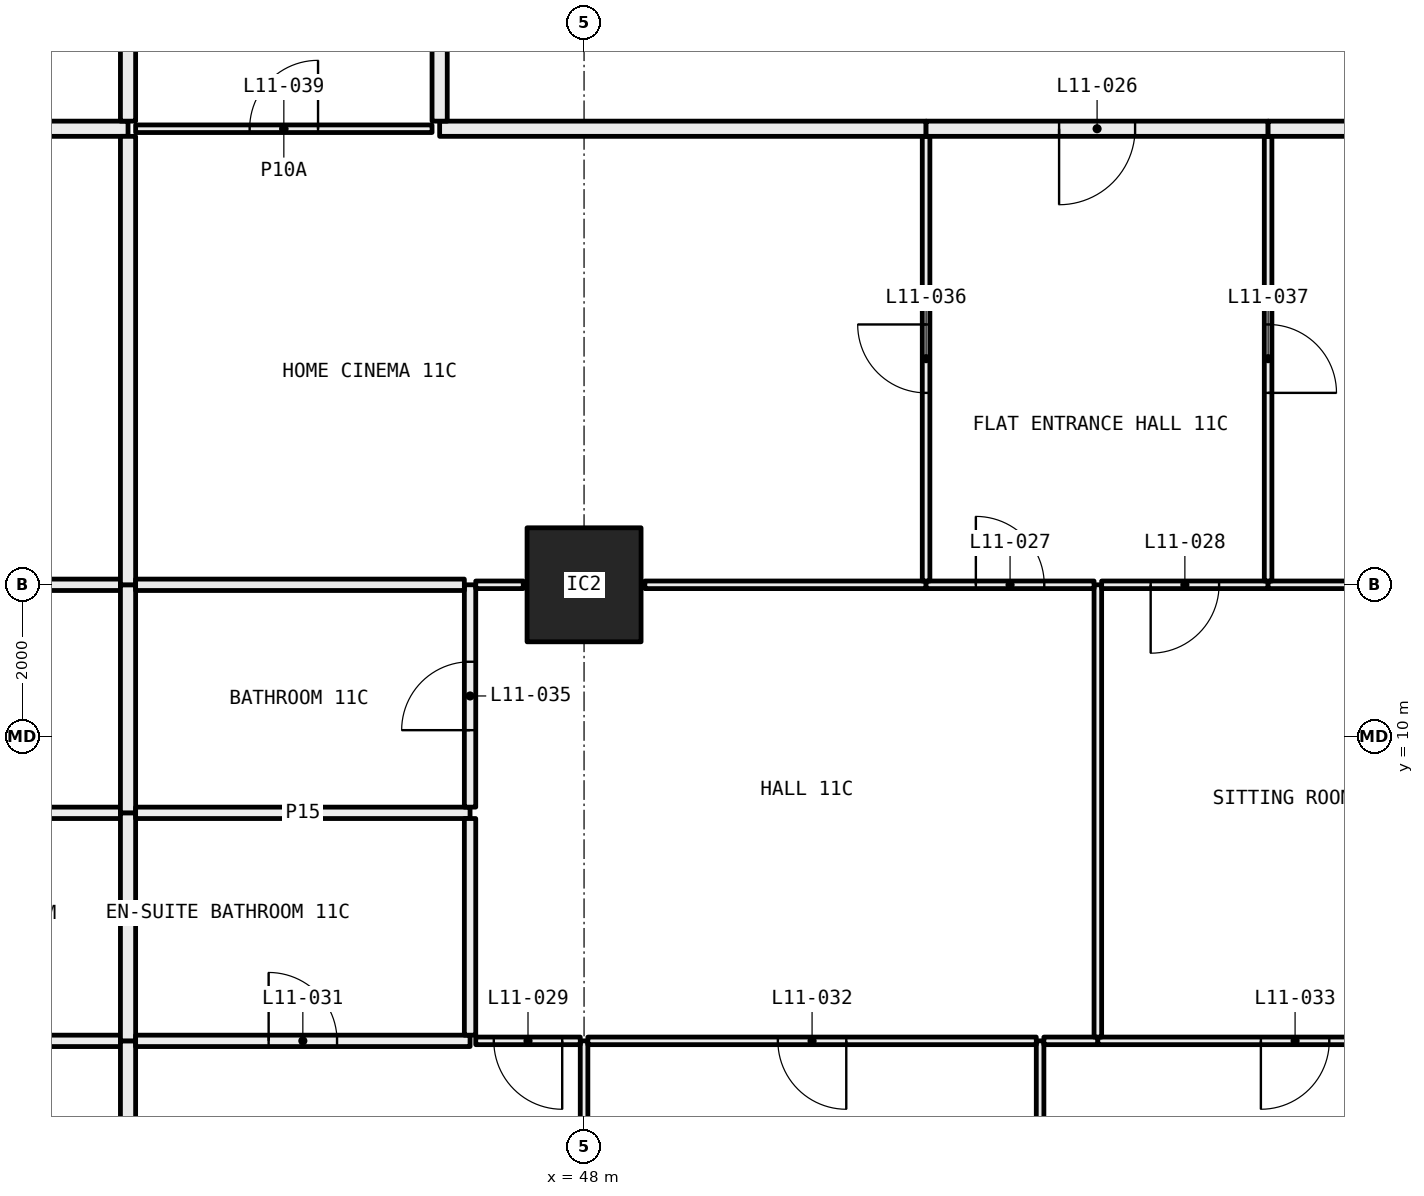
"""IFC4 building model, lengths in metres.
Left out: names, types, materials, properties, quantities, classifications, styles, units other than length and angle.
Written with IfcOpenShell. Run it as: python <this file> out.ifc"""

import sys

from ifc_helpers import new_model, si_unit, direction, frame, frame_2d, origin, origin_2d, place, context, subcontext, project, spatial, rectangle, hollow_rectangle, extrude, element, fill, save


model = new_model("IFC4")
c1 = context("Model", 3, precision=1e-05, world=origin(), true_north=direction((0.0, 1.0)))
c2 = subcontext(c1, "Body", "Model", "MODEL_VIEW")
j1 = project(units=[si_unit("LENGTHUNIT", "METRE"), si_unit("PLANEANGLEUNIT", "RADIAN")], contexts=[c1])
p1 = place(None, origin())
s1 = spatial("IfcSite", under=j1, at=p1, CompositionType="ELEMENT")
p2 = place(p1, origin())
s2 = spatial("IfcBuilding", under=s1, at=p2, CompositionType="ELEMENT")
p3 = place(p2, frame((0.0, 0.0, 50.7)))
s3 = spatial("IfcBuildingStorey", under=s2, at=p3, CompositionType="ELEMENT", Elevation=50.7)
p4 = place(p3, frame((48.0, 12.0, 0.0), z_axis=(0.0, 0.0, 1.0), x_axis=(1.0, 0.0, 0.0)))
e1 = element("IfcColumn", 1, at=p4, inside=s3, PredefinedType="COLUMN", context=c2, shape_type="SweptSolid", body=[
    extrude(hollow_rectangle(XDim=1.5, YDim=1.5, WallThickness=0.065, at=origin_2d()), origin(), (0.0, 0.0, 1.0), 3.05),
])
p5 = place(p3, frame((41.9, 6.0, 0.0), z_axis=(0.0, 0.0, 1.0), x_axis=(-1.0, 0.0, 0.0)))
e2 = element("IfcWall", 2, at=p5, inside=s3, PredefinedType="PARTITIONING", context=c2, shape_type="SweptSolid", body=[
    extrude(rectangle(XDim=4.4, YDim=0.15, at=frame_2d((2.2, 0.0))), origin(), (0.0, 0.0, 1.0), 3.05),
])
p6 = place(p3, frame((42.0, 0.72, 0.0), z_axis=(0.0, 0.0, 1.0), x_axis=(0.0, 1.0, 0.0)))
e3 = element("IfcWall", 3, at=p6, inside=s3, PredefinedType="PARTITIONING", context=c2, shape_type="SweptSolid", body=[
    extrude(rectangle(XDim=5.28, YDim=0.2, at=frame_2d((2.64, 0.0))), origin(), (0.0, 0.0, 1.0), 3.05),
])
p7 = place(p3, frame((41.9, 9.0, 0.0), z_axis=(0.0, 0.0, 1.0), x_axis=(-1.0, 0.0, 0.0)))
e4 = element("IfcWall", 4, at=p7, inside=s3, PredefinedType="PARTITIONING", context=c2, shape_type="SweptSolid", body=[
    extrude(rectangle(XDim=4.325, YDim=0.15, at=frame_2d((2.163, 0.0))), origin(), (0.0, 0.0, 1.0), 3.05),
])
p8 = place(p3, frame((42.0, 6.0, 0.0), z_axis=(0.0, 0.0, 1.0), x_axis=(0.0, 1.0, 0.0)))
e5 = element("IfcWall", 5, at=p8, inside=s3, PredefinedType="PARTITIONING", context=c2, shape_type="SweptSolid", body=[
    extrude(rectangle(XDim=3.0, YDim=0.2, at=frame_2d((1.5, 0.0))), origin(), (0.0, 0.0, 1.0), 3.05),
])
p9 = place(p3, frame((41.9, 12.0, 0.0), z_axis=(0.0, 0.0, 1.0), x_axis=(-1.0, 0.0, 0.0)))
e6 = element("IfcWall", 6, at=p9, inside=s3, PredefinedType="PARTITIONING", context=c2, shape_type="SweptSolid", body=[
    extrude(rectangle(XDim=4.325, YDim=0.15, at=frame_2d((2.163, 0.0))), origin(), (0.0, 0.0, 1.0), 2.45),
])
p10 = place(p3, frame((42.0, 9.0, 0.0), z_axis=(0.0, 0.0, 1.0), x_axis=(0.0, 1.0, 0.0)))
e7 = element("IfcWall", 7, at=p10, inside=s3, PredefinedType="PARTITIONING", context=c2, shape_type="SweptSolid", body=[
    extrude(rectangle(XDim=3.0, YDim=0.2, at=frame_2d((1.5, 0.0))), origin(), (0.0, 0.0, 1.0), 2.45),
])
p11 = place(p3, frame((42.0, 18.0, 0.0), z_axis=(0.0, 0.0, 1.0), x_axis=(-1.0, 0.0, 0.0)))
e8 = element("IfcWall", 8, at=p11, inside=s3, PredefinedType="PARTITIONING", context=c2, shape_type="SweptSolid", body=[
    extrude(rectangle(XDim=6.0, YDim=0.2, at=frame_2d((3.0, 0.0))), origin(), (0.0, 0.0, 1.0), 2.45),
])
p12 = place(p3, frame((42.0, 12.0, 0.0), z_axis=(0.0, 0.0, 1.0), x_axis=(0.0, 1.0, 0.0)))
e9 = element("IfcWall", 9, at=p12, inside=s3, PredefinedType="PARTITIONING", context=c2, shape_type="SweptSolid", body=[
    extrude(rectangle(XDim=5.9, YDim=0.2, at=frame_2d((2.95, 0.0))), origin(), (0.0, 0.0, 1.0), 2.45),
])
p13 = place(p3, frame((42.0, 18.1, 0.0), z_axis=(0.0, 0.0, 1.0), x_axis=(0.0, 1.0, 0.0)))
e10 = element("IfcWall", 10, at=p13, inside=s3, PredefinedType="PARTITIONING", context=c2, shape_type="SweptSolid", body=[
    extrude(rectangle(XDim=6.2, YDim=0.2, at=frame_2d((3.1, 0.0))), origin(), (0.0, 0.0, 1.0), 2.45),
])
p14 = place(p3, frame((48.0, 0.72, 0.0), z_axis=(0.0, 0.0, 1.0), x_axis=(0.0, 1.0, 0.0)))
e11 = element("IfcWall", 11, at=p14, inside=s3, PredefinedType="PARTITIONING", context=c2, shape_type="SweptSolid", body=[
    extrude(rectangle(XDim=5.28, YDim=0.1, at=frame_2d((2.64, 0.0))), origin(), (0.0, 0.0, 1.0), 2.45),
])
p15 = place(p3, frame((46.5, 6.0, 0.0), z_axis=(0.0, 0.0, 1.0), x_axis=(-1.0, 0.0, 0.0)))
e12 = element("IfcWall", 12, at=p15, inside=s3, PredefinedType="PARTITIONING", context=c2, shape_type="SweptSolid", body=[
    extrude(rectangle(XDim=4.4, YDim=0.15, at=frame_2d((2.2, 0.0))), origin(), (0.0, 0.0, 1.0), 3.05),
])
p16 = place(p15, frame((1.75, 0.0, 0.0)))
e13 = element("IfcOpeningElement", 13, at=p16, cuts=e12, PredefinedType="OPENING", context=c2, shape_type="SweptSolid", body=[
    extrude(rectangle(XDim=0.9, YDim=2.1, at=frame_2d((0.45, 1.05))), frame((0.0, 0.085, 0.0), z_axis=(0.0, -1.0, 0.0), x_axis=(1.0, 0.0, 0.0)), (0.0, 0.0, 1.0), 0.17),
])
p17 = place(p3, frame((47.95, 6.0, 0.0), z_axis=(0.0, 0.0, 1.0), x_axis=(-1.0, 0.0, 0.0)))
e14 = element("IfcWall", 14, at=p17, inside=s3, PredefinedType="PARTITIONING", context=c2, shape_type="SweptSolid", body=[
    extrude(rectangle(XDim=1.375, YDim=0.1, at=frame_2d((0.688, 0.0))), origin(), (0.0, 0.0, 1.0), 2.45),
])
p18 = place(p17, frame((0.238, 0.0, 0.0)))
e15 = element("IfcOpeningElement", 15, at=p18, cuts=e14, PredefinedType="OPENING", context=c2, shape_type="SweptSolid", body=[
    extrude(rectangle(XDim=0.9, YDim=2.1, at=frame_2d((0.45, 1.05))), frame((0.0, 0.06, 0.0), z_axis=(0.0, -1.0, 0.0), x_axis=(1.0, 0.0, 0.0)), (0.0, 0.0, 1.0), 0.12),
])
p19 = place(p3, frame((54.0, 0.72, 0.0), z_axis=(0.0, 0.0, 1.0), x_axis=(0.0, 1.0, 0.0)))
e16 = element("IfcWall", 16, at=p19, inside=s3, PredefinedType="PARTITIONING", context=c2, shape_type="SweptSolid", body=[
    extrude(rectangle(XDim=5.28, YDim=0.1, at=frame_2d((2.64, 0.0))), origin(), (0.0, 0.0, 1.0), 3.05),
])
p20 = place(p3, frame((53.95, 6.0, 0.0), z_axis=(0.0, 0.0, 1.0), x_axis=(-1.0, 0.0, 0.0)))
e17 = element("IfcWall", 17, at=p20, inside=s3, PredefinedType="PARTITIONING", context=c2, shape_type="SweptSolid", body=[
    extrude(rectangle(XDim=5.9, YDim=0.1, at=frame_2d((2.95, 0.0))), origin(), (0.0, 0.0, 1.0), 2.45),
])
p21 = place(p20, frame((2.5, 0.0, 0.0)))
e18 = element("IfcOpeningElement", 18, at=p21, cuts=e17, PredefinedType="OPENING", context=c2, shape_type="SweptSolid", body=[
    extrude(rectangle(XDim=0.9, YDim=2.1, at=frame_2d((0.45, 1.05))), frame((0.0, 0.06, 0.0), z_axis=(0.0, -1.0, 0.0), x_axis=(1.0, 0.0, 0.0)), (0.0, 0.0, 1.0), 0.12),
])
p22 = place(p3, frame((54.76, 6.0, 0.0), z_axis=(0.0, 0.0, 1.0), x_axis=(-1.0, 0.0, 0.0)))
e19 = element("IfcWall", 19, at=p22, inside=s3, PredefinedType="PARTITIONING", context=c2, shape_type="SweptSolid", body=[
    extrude(rectangle(XDim=0.71, YDim=0.1, at=frame_2d((0.355, 0.0))), origin(), (0.0, 0.0, 1.0), 3.05),
])
p23 = place(p3, frame((59.95, 6.0, 0.0), z_axis=(0.0, 0.0, 1.0), x_axis=(-1.0, 0.0, 0.0)))
e20 = element("IfcWall", 20, at=p23, inside=s3, PredefinedType="PARTITIONING", context=c2, shape_type="SweptSolid", body=[
    extrude(rectangle(XDim=5.19, YDim=0.1, at=frame_2d((2.595, 0.0))), origin(), (0.0, 0.0, 1.0), 2.45),
])
p24 = place(p23, frame((2.145, 0.0, 0.0)))
e21 = element("IfcOpeningElement", 21, at=p24, cuts=e20, PredefinedType="OPENING", context=c2, shape_type="SweptSolid", body=[
    extrude(rectangle(XDim=0.9, YDim=2.1, at=frame_2d((0.45, 1.05))), frame((0.0, 0.06, 0.0), z_axis=(0.0, -1.0, 0.0), x_axis=(1.0, 0.0, 0.0)), (0.0, 0.0, 1.0), 0.12),
])
p25 = place(p3, frame((46.5, 9.0, 0.0), z_axis=(0.0, 0.0, 1.0), x_axis=(-1.0, 0.0, 0.0)))
e22 = element("IfcWall", 22, at=p25, inside=s3, PredefinedType="PARTITIONING", context=c2, shape_type="SweptSolid", body=[
    extrude(rectangle(XDim=4.4, YDim=0.15, at=frame_2d((2.2, 0.0))), origin(), (0.0, 0.0, 1.0), 3.05),
])
p26 = place(p3, frame((46.5, 6.075, 0.0), z_axis=(0.0, 0.0, 1.0), x_axis=(0.0, 1.0, 0.0)))
e23 = element("IfcWall", 23, at=p26, inside=s3, PredefinedType="PARTITIONING", context=c2, shape_type="SweptSolid", body=[
    extrude(rectangle(XDim=2.85, YDim=0.15, at=frame_2d((1.425, 0.0))), origin(), (0.0, 0.0, 1.0), 3.05),
])
p27 = place(p3, frame((46.5, 9.075, 0.0), z_axis=(0.0, 0.0, 1.0), x_axis=(0.0, 1.0, 0.0)))
e24 = element("IfcWall", 24, at=p27, inside=s3, PredefinedType="PARTITIONING", context=c2, shape_type="SweptSolid", body=[
    extrude(rectangle(XDim=2.925, YDim=0.15, at=frame_2d((1.462, 0.0))), origin(), (0.0, 0.0, 1.0), 2.45),
])
p28 = place(p27, frame((1.012, 0.0, 0.0)))
e25 = element("IfcOpeningElement", 25, at=p28, cuts=e24, PredefinedType="OPENING", context=c2, shape_type="SweptSolid", body=[
    extrude(rectangle(XDim=0.9, YDim=2.1, at=frame_2d((0.45, 1.05))), frame((0.0, 0.085, 0.0), z_axis=(0.0, -1.0, 0.0), x_axis=(1.0, 0.0, 0.0)), (0.0, 0.0, 1.0), 0.17),
])
p29 = place(p3, frame((46.425, 12.0, 0.0), z_axis=(0.0, 0.0, 1.0), x_axis=(-1.0, 0.0, 0.0)))
e26 = element("IfcWall", 26, at=p29, inside=s3, PredefinedType="PARTITIONING", context=c2, shape_type="SweptSolid", body=[
    extrude(rectangle(XDim=4.325, YDim=0.15, at=frame_2d((2.163, 0.0))), origin(), (0.0, 0.0, 1.0), 2.45),
])
p30 = place(p3, frame((54.76, 6.05, 0.0), z_axis=(0.0, 0.0, 1.0), x_axis=(0.0, 1.0, 0.0)))
e27 = element("IfcWall", 27, at=p30, inside=s3, PredefinedType="PARTITIONING", context=c2, shape_type="SweptSolid", body=[
    extrude(rectangle(XDim=5.95, YDim=0.1, at=frame_2d((2.975, 0.0))), origin(), (0.0, 0.0, 1.0), 2.45),
])
p31 = place(p3, frame((47.2, 12.0, 0.0), z_axis=(0.0, 0.0, 1.0), x_axis=(-1.0, 0.0, 0.0)))
e28 = element("IfcWall", 28, at=p31, inside=s3, PredefinedType="PARTITIONING", context=c2, shape_type="SweptSolid", body=[
    extrude(rectangle(XDim=0.625, YDim=0.1, at=frame_2d((0.312, 0.0))), origin(), (0.0, 0.0, 1.0), 2.45),
])
p32 = place(p3, frame((52.5, 12.0, 0.0), z_axis=(0.0, 0.0, 1.0), x_axis=(-1.0, 0.0, 0.0)))
e29 = element("IfcWall", 29, at=p32, inside=s3, PredefinedType="PARTITIONING", context=c2, shape_type="SweptSolid", body=[
    extrude(rectangle(XDim=3.7, YDim=0.1, at=frame_2d((1.85, 0.0))), origin(), (0.0, 0.0, 1.0), 2.45),
])
p33 = place(p3, frame((54.71, 12.0, 0.0), z_axis=(0.0, 0.0, 1.0), x_axis=(-1.0, 0.0, 0.0)))
e30 = element("IfcWall", 30, at=p33, inside=s3, PredefinedType="PARTITIONING", context=c2, shape_type="SweptSolid", body=[
    extrude(rectangle(XDim=2.21, YDim=0.1, at=frame_2d((1.105, 0.0))), origin(), (0.0, 0.0, 1.0), 2.45),
])
p34 = place(p33, frame((0.655, 0.0, 0.0)))
e31 = element("IfcOpeningElement", 31, at=p34, cuts=e30, PredefinedType="OPENING", context=c2, shape_type="SweptSolid", body=[
    extrude(rectangle(XDim=0.9, YDim=2.1, at=frame_2d((0.45, 1.05))), frame((0.0, 0.06, 0.0), z_axis=(0.0, -1.0, 0.0), x_axis=(1.0, 0.0, 0.0)), (0.0, 0.0, 1.0), 0.12),
])
p35 = place(p3, frame((57.0, 12.0, 0.0), z_axis=(0.0, 0.0, 1.0), x_axis=(-1.0, 0.0, 0.0)))
e32 = element("IfcWall", 32, at=p35, inside=s3, PredefinedType="PARTITIONING", context=c2, shape_type="SweptSolid", body=[
    extrude(rectangle(XDim=2.19, YDim=0.1, at=frame_2d((1.095, 0.0))), origin(), (0.0, 0.0, 1.0), 2.45),
])
p36 = place(p35, frame((0.645, 0.0, 0.0)))
e33 = element("IfcOpeningElement", 33, at=p36, cuts=e32, PredefinedType="OPENING", context=c2, shape_type="SweptSolid", body=[
    extrude(rectangle(XDim=0.9, YDim=2.1, at=frame_2d((0.45, 1.05))), frame((0.0, 0.06, 0.0), z_axis=(0.0, -1.0, 0.0), x_axis=(1.0, 0.0, 0.0)), (0.0, 0.0, 1.0), 0.12),
])
p37 = place(p3, frame((59.2, 12.0, 0.0), z_axis=(0.0, 0.0, 1.0), x_axis=(-1.0, 0.0, 0.0)))
e34 = element("IfcWall", 34, at=p37, inside=s3, PredefinedType="PARTITIONING", context=c2, shape_type="SweptSolid", body=[
    extrude(rectangle(XDim=2.2, YDim=0.1, at=frame_2d((1.1, 0.0))), origin(), (0.0, 0.0, 1.0), 2.45),
])
p38 = place(p3, frame((52.5, 12.05, 0.0), z_axis=(0.0, 0.0, 1.0), x_axis=(0.0, 1.0, 0.0)))
e35 = element("IfcWall", 35, at=p38, inside=s3, PredefinedType="PARTITIONING", context=c2, shape_type="SweptSolid", body=[
    extrude(rectangle(XDim=5.85, YDim=0.1, at=frame_2d((2.925, 0.0))), origin(), (0.0, 0.0, 1.0), 2.45),
])
p39 = place(p38, frame((2.475, 0.0, 0.0)))
e36 = element("IfcOpeningElement", 36, at=p39, cuts=e35, PredefinedType="OPENING", context=c2, shape_type="SweptSolid", body=[
    extrude(rectangle(XDim=0.9, YDim=2.1, at=frame_2d((0.45, 1.05))), frame((0.0, 0.06, 0.0), z_axis=(0.0, -1.0, 0.0), x_axis=(1.0, 0.0, 0.0)), (0.0, 0.0, 1.0), 0.12),
])
p40 = place(p3, frame((46.0, 18.0, 0.0), z_axis=(0.0, 0.0, 1.0), x_axis=(-1.0, 0.0, 0.0)))
e37 = element("IfcWall", 37, at=p40, inside=s3, PredefinedType="PARTITIONING", context=c2, shape_type="SweptSolid", body=[
    extrude(rectangle(XDim=3.9, YDim=0.1, at=frame_2d((1.95, 0.0))), origin(), (0.0, 0.0, 1.0), 3.05),
])
p41 = place(p40, frame((1.5, 0.0, 0.0)))
e38 = element("IfcOpeningElement", 38, at=p41, cuts=e37, PredefinedType="OPENING", context=c2, shape_type="SweptSolid", body=[
    extrude(rectangle(XDim=0.9, YDim=2.1, at=frame_2d((0.45, 1.05))), frame((0.0, 0.06, 0.0), z_axis=(0.0, -1.0, 0.0), x_axis=(1.0, 0.0, 0.0)), (0.0, 0.0, 1.0), 0.12),
])
p42 = place(p3, frame((52.5, 18.0, 0.0), z_axis=(0.0, 0.0, 1.0), x_axis=(-1.0, 0.0, 0.0)))
e39 = element("IfcWall", 39, at=p42, inside=s3, PredefinedType="PARTITIONING", context=c2, shape_type="SweptSolid", body=[
    extrude(rectangle(XDim=6.4, YDim=0.2, at=frame_2d((3.2, 0.0))), origin(), (0.0, 0.0, 1.0), 3.05),
])
p43 = place(p3, frame((57.0, 12.05, 0.0), z_axis=(0.0, 0.0, 1.0), x_axis=(0.0, 1.0, 0.0)))
e40 = element("IfcWall", 40, at=p43, inside=s3, PredefinedType="PARTITIONING", context=c2, shape_type="SweptSolid", body=[
    extrude(rectangle(XDim=5.85, YDim=0.1, at=frame_2d((2.925, 0.0))), origin(), (0.0, 0.0, 1.0), 2.45),
])
p44 = place(p43, frame((2.475, 0.0, 0.0)))
e41 = element("IfcOpeningElement", 41, at=p44, cuts=e40, PredefinedType="OPENING", context=c2, shape_type="SweptSolid", body=[
    extrude(rectangle(XDim=0.9, YDim=2.1, at=frame_2d((0.45, 1.05))), frame((0.0, 0.06, 0.0), z_axis=(0.0, -1.0, 0.0), x_axis=(1.0, 0.0, 0.0)), (0.0, 0.0, 1.0), 0.12),
])
p45 = place(p3, frame((57.0, 18.0, 0.0), z_axis=(0.0, 0.0, 1.0), x_axis=(-1.0, 0.0, 0.0)))
e42 = element("IfcWall", 42, at=p45, inside=s3, PredefinedType="PARTITIONING", context=c2, shape_type="SweptSolid", body=[
    extrude(rectangle(XDim=4.5, YDim=0.2, at=frame_2d((2.25, 0.0))), origin(), (0.0, 0.0, 1.0), 3.05),
])
p46 = place(p45, frame((1.75, 0.0, 0.0)))
e43 = element("IfcOpeningElement", 43, at=p46, cuts=e42, PredefinedType="OPENING", context=c2, shape_type="SweptSolid", body=[
    extrude(rectangle(XDim=1.0, YDim=2.1, at=frame_2d((0.5, 1.05))), frame((0.0, 0.11, 0.0), z_axis=(0.0, -1.0, 0.0), x_axis=(1.0, 0.0, 0.0)), (0.0, 0.0, 1.0), 0.22),
])
p47 = place(p3, frame((61.9, 18.0, 0.0), z_axis=(0.0, 0.0, 1.0), x_axis=(-1.0, 0.0, 0.0)))
e44 = element("IfcWall", 44, at=p47, inside=s3, PredefinedType="PARTITIONING", context=c2, shape_type="SweptSolid", body=[
    extrude(rectangle(XDim=4.9, YDim=0.2, at=frame_2d((2.45, 0.0))), origin(), (0.0, 0.0, 1.0), 3.05),
])
p48 = place(p3, frame((46.1, 18.1, 0.0), z_axis=(0.0, 0.0, 1.0), x_axis=(0.0, 1.0, 0.0)))
e45 = element("IfcWall", 45, at=p48, inside=s3, PredefinedType="PARTITIONING", context=c2, shape_type="SweptSolid", body=[
    extrude(rectangle(XDim=6.2, YDim=0.2, at=frame_2d((3.1, 0.0))), origin(), (0.0, 0.0, 1.0), 2.45),
])
p49 = place(p46, origin())
e46 = element("IfcDoor", 46, at=p49, inside=s3, OperationType="SINGLE_SWING_LEFT", PredefinedType="DOOR", context=c2, shape_type="SweptSolid", body=[
    extrude(rectangle(XDim=1.0, YDim=2.1, at=frame_2d((0.5, 1.05))), frame((0.0, 0.025, 0.0), z_axis=(0.0, -1.0, 0.0), x_axis=(1.0, 0.0, 0.0)), (0.0, 0.0, 1.0), 0.05),
])
fill(e43, e46)
p50 = place(p34, frame((0.9, 0.0, 0.0), x_axis=(-1.0, 0.0, 0.0)))
e47 = element("IfcDoor", 47, at=p50, inside=s3, OperationType="SINGLE_SWING_RIGHT", PredefinedType="DOOR", context=c2, shape_type="SweptSolid", body=[
    extrude(rectangle(XDim=0.9, YDim=2.1, at=frame_2d((0.45, 1.05))), frame((0.0, 0.025, 0.0), z_axis=(0.0, -1.0, 0.0), x_axis=(1.0, 0.0, 0.0)), (0.0, 0.0, 1.0), 0.05),
])
fill(e31, e47)
p51 = place(p36, origin())
e48 = element("IfcDoor", 48, at=p51, inside=s3, OperationType="SINGLE_SWING_LEFT", PredefinedType="DOOR", context=c2, shape_type="SweptSolid", body=[
    extrude(rectangle(XDim=0.9, YDim=2.1, at=frame_2d((0.45, 1.05))), frame((0.0, 0.025, 0.0), z_axis=(0.0, -1.0, 0.0), x_axis=(1.0, 0.0, 0.0)), (0.0, 0.0, 1.0), 0.05),
])
fill(e33, e48)
p52 = place(p18, origin())
e49 = element("IfcDoor", 49, at=p52, inside=s3, OperationType="SINGLE_SWING_RIGHT", PredefinedType="DOOR", context=c2, shape_type="SweptSolid", body=[
    extrude(rectangle(XDim=0.9, YDim=2.1, at=frame_2d((0.45, 1.05))), frame((0.0, 0.025, 0.0), z_axis=(0.0, -1.0, 0.0), x_axis=(1.0, 0.0, 0.0)), (0.0, 0.0, 1.0), 0.05),
])
fill(e15, e49)
p53 = place(p16, frame((0.9, 0.0, 0.0), x_axis=(-1.0, 0.0, 0.0)))
e50 = element("IfcDoor", 50, at=p53, inside=s3, OperationType="SINGLE_SWING_RIGHT", PredefinedType="DOOR", context=c2, shape_type="SweptSolid", body=[
    extrude(rectangle(XDim=0.9, YDim=2.1, at=frame_2d((0.45, 1.05))), frame((0.0, 0.025, 0.0), z_axis=(0.0, -1.0, 0.0), x_axis=(1.0, 0.0, 0.0)), (0.0, 0.0, 1.0), 0.05),
])
fill(e13, e50)
p54 = place(p21, origin())
e51 = element("IfcDoor", 51, at=p54, inside=s3, OperationType="SINGLE_SWING_RIGHT", PredefinedType="DOOR", context=c2, shape_type="SweptSolid", body=[
    extrude(rectangle(XDim=0.9, YDim=2.1, at=frame_2d((0.45, 1.05))), frame((0.0, 0.025, 0.0), z_axis=(0.0, -1.0, 0.0), x_axis=(1.0, 0.0, 0.0)), (0.0, 0.0, 1.0), 0.05),
])
fill(e18, e51)
p55 = place(p24, origin())
e52 = element("IfcDoor", 52, at=p55, inside=s3, OperationType="SINGLE_SWING_LEFT", PredefinedType="DOOR", context=c2, shape_type="SweptSolid", body=[
    extrude(rectangle(XDim=0.9, YDim=2.1, at=frame_2d((0.45, 1.05))), frame((0.0, 0.025, 0.0), z_axis=(0.0, -1.0, 0.0), x_axis=(1.0, 0.0, 0.0)), (0.0, 0.0, 1.0), 0.05),
])
fill(e21, e52)
p56 = place(p28, origin())
e53 = element("IfcDoor", 53, at=p56, inside=s3, OperationType="SINGLE_SWING_RIGHT", PredefinedType="DOOR", context=c2, shape_type="SweptSolid", body=[
    extrude(rectangle(XDim=0.9, YDim=2.1, at=frame_2d((0.45, 1.05))), frame((0.0, 0.025, 0.0), z_axis=(0.0, -1.0, 0.0), x_axis=(1.0, 0.0, 0.0)), (0.0, 0.0, 1.0), 0.05),
])
fill(e25, e53)
p57 = place(p39, origin())
e54 = element("IfcDoor", 54, at=p57, inside=s3, OperationType="SINGLE_SWING_LEFT", PredefinedType="DOOR", context=c2, shape_type="SweptSolid", body=[
    extrude(rectangle(XDim=0.9, YDim=2.1, at=frame_2d((0.45, 1.05))), frame((0.0, 0.025, 0.0), z_axis=(0.0, -1.0, 0.0), x_axis=(1.0, 0.0, 0.0)), (0.0, 0.0, 1.0), 0.05),
])
fill(e36, e54)
p58 = place(p44, frame((0.9, 0.0, 0.0), x_axis=(-1.0, 0.0, 0.0)))
e55 = element("IfcDoor", 55, at=p58, inside=s3, OperationType="SINGLE_SWING_LEFT", PredefinedType="DOOR", context=c2, shape_type="SweptSolid", body=[
    extrude(rectangle(XDim=0.9, YDim=2.1, at=frame_2d((0.45, 1.05))), frame((0.0, 0.025, 0.0), z_axis=(0.0, -1.0, 0.0), x_axis=(1.0, 0.0, 0.0)), (0.0, 0.0, 1.0), 0.05),
])
fill(e41, e55)
p59 = place(p41, frame((0.9, 0.0, 0.0), x_axis=(-1.0, 0.0, 0.0)))
e56 = element("IfcDoor", 56, at=p59, inside=s3, OperationType="SINGLE_SWING_LEFT", PredefinedType="DOOR", context=c2, shape_type="SweptSolid", body=[
    extrude(rectangle(XDim=0.9, YDim=2.1, at=frame_2d((0.45, 1.05))), frame((0.0, 0.025, 0.0), z_axis=(0.0, -1.0, 0.0), x_axis=(1.0, 0.0, 0.0)), (0.0, 0.0, 1.0), 0.05),
])
fill(e38, e56)
save(model, sys.argv[1])
